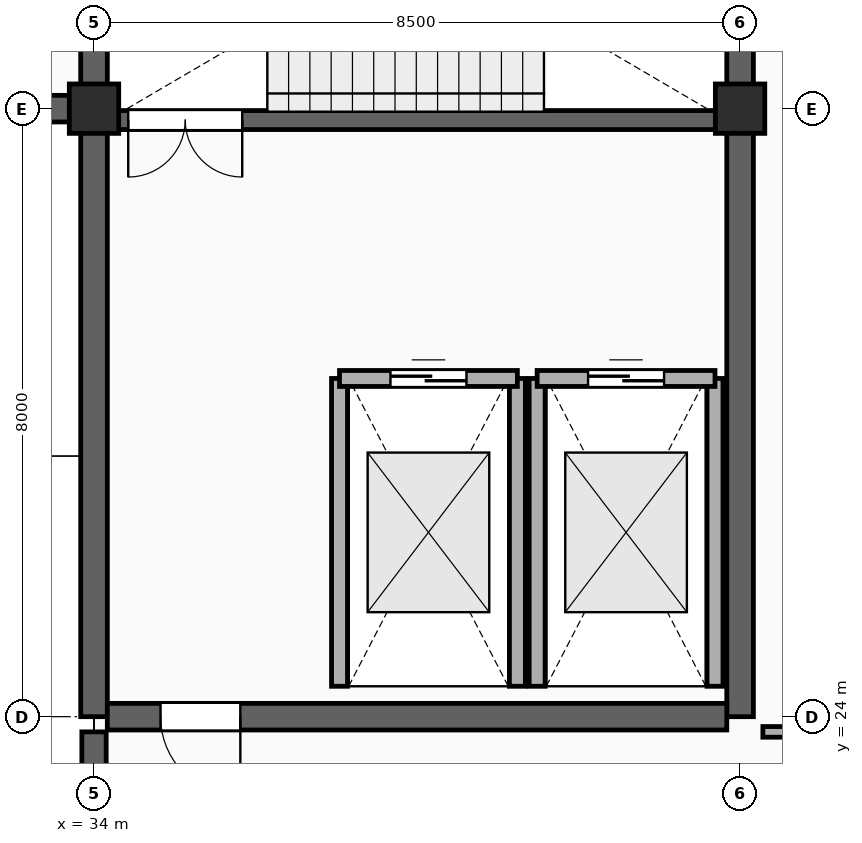
"""IFC4 building model, lengths in metres.
Left out: names, types, materials, properties, quantities, classifications, styles, units other than length and angle.
Written with IfcOpenShell. Run it as: python <this file> out.ifc"""

import sys

from ifc_helpers import new_model, si_unit, direction, frame, frame_2d, origin, origin_2d, place, context, subcontext, project, spatial, rectangle, extrude, element, fill, save


model = new_model("IFC4")
c1 = context("Model", 3, precision=1e-05, world=origin(), true_north=direction((0.0, 1.0)))
c2 = subcontext(c1, "Body", "Model", "MODEL_VIEW")
j1 = project(units=[si_unit("LENGTHUNIT", "METRE"), si_unit("PLANEANGLEUNIT", "RADIAN")], contexts=[c1])
p1 = place(None, origin())
s1 = spatial("IfcSite", under=j1, at=p1, CompositionType="ELEMENT")
p2 = place(p1, origin())
s2 = spatial("IfcBuilding", under=s1, at=p2, CompositionType="ELEMENT")
p3 = place(p2, frame((0.0, 0.0, 15.0)))
s3 = spatial("IfcBuildingStorey", under=s2, at=p3, CompositionType="ELEMENT", Elevation=15.0)
p4 = place(p3, frame((34.0, 32.0, 0.0), z_axis=(0.0, 0.0, 1.0), x_axis=(0.0, 1.0, 0.0)))
e1 = element("IfcWall", 1, at=p4, inside=s3, PredefinedType="SHEAR", context=c2, shape_type="SweptSolid", body=[
    extrude(rectangle(XDim=12.8, YDim=0.35, at=frame_2d((6.4, 0.0))), origin(), (0.0, 0.0, 1.0), 4.49),
])
p5 = place(p3, frame((25.675, 32.0, 0.0), z_axis=(0.0, 0.0, 1.0), x_axis=(1.0, 0.0, 0.0)))
e2 = element("IfcWall", 2, at=p5, inside=s3, PredefinedType="SHEAR", context=c2, shape_type="SweptSolid", body=[
    extrude(rectangle(XDim=8.15, YDim=0.35, at=frame_2d((4.075, 0.0))), origin(), (0.0, 0.0, 1.0), 4.49),
])
p6 = place(p3, frame((34.0, 24.0, 0.0), z_axis=(0.0, 0.0, 1.0), x_axis=(0.0, 1.0, 0.0)))
e3 = element("IfcWall", 3, at=p6, inside=s3, PredefinedType="SHEAR", context=c2, shape_type="SweptSolid", body=[
    extrude(rectangle(XDim=7.8, YDim=0.35, at=frame_2d((3.9, 0.0))), origin(), (0.0, 0.0, 1.0), 4.64),
])
p7 = place(p3, frame((42.5, 24.0, 0.0), z_axis=(0.0, 0.0, 1.0), x_axis=(0.0, 1.0, 0.0)))
e4 = element("IfcWall", 4, at=p7, inside=s3, PredefinedType="SHEAR", context=c2, shape_type="SweptSolid", body=[
    extrude(rectangle(XDim=12.8, YDim=0.35, at=frame_2d((6.4, 0.0))), origin(), (0.0, 0.0, 1.0), 4.64),
])
p8 = place(p3, frame((34.175, 24.0, 0.0), z_axis=(0.0, 0.0, 1.0), x_axis=(1.0, 0.0, 0.0)))
e5 = element("IfcWall", 5, at=p8, inside=s3, PredefinedType="SHEAR", context=c2, shape_type="SweptSolid", body=[
    extrude(rectangle(XDim=8.15, YDim=0.35, at=frame_2d((4.075, 0.0))), origin(), (0.0, 0.0, 1.0), 4.64),
])
p9 = place(p8, frame((0.7, 0.0, 0.0)))
e6 = element("IfcOpeningElement", 6, at=p9, cuts=e5, PredefinedType="OPENING", context=c2, shape_type="SweptSolid", body=[
    extrude(rectangle(XDim=1.05, YDim=2.15, at=frame_2d((0.525, 1.075))), frame((0.0, 0.187, 0.0), z_axis=(0.0, -1.0, 0.0), x_axis=(1.0, 0.0, 0.0)), (0.0, 0.0, 1.0), 0.374),
])
p10 = place(p3, frame((34.25, 31.85, 0.0), z_axis=(0.0, 0.0, 1.0), x_axis=(1.0, 0.0, 0.0)))
e7 = element("IfcWall", 7, at=p10, inside=s3, PredefinedType="STANDARD", context=c2, shape_type="SweptSolid", body=[
    extrude(rectangle(XDim=8.0, YDim=0.25, at=frame_2d((4.0, 0.0))), origin(), (0.0, 0.0, 1.0), 4.64),
])
p11 = place(p10, frame((0.2, 0.0, 0.0)))
e8 = element("IfcOpeningElement", 8, at=p11, cuts=e7, PredefinedType="OPENING", context=c2, shape_type="SweptSolid", body=[
    extrude(rectangle(XDim=1.5, YDim=2.2, at=frame_2d((0.75, 1.1))), frame((0.0, 0.137, 0.0), z_axis=(0.0, -1.0, 0.0), x_axis=(1.0, 0.0, 0.0)), (0.0, 0.0, 1.0), 0.274),
])
for number, where, z_axis, x_axis in (
    (9, (37.23, 24.4, 0.0), (0.0, 0.0, 1.0), (0.0, 1.0, 0.0)),
    (10, (39.57, 24.4, 0.0), (0.0, 0.0, 1.0), (0.0, 1.0, 0.0)),
):
    element("IfcWall", number, at=place(p3, frame(where, z_axis=z_axis, x_axis=x_axis)), inside=s3, PredefinedType="PARTITIONING", context=c2, shape_type="SweptSolid", body=[
        extrude(rectangle(XDim=4.05, YDim=0.21, at=frame_2d((2.025, 0.0))), origin(), (0.0, 0.0, 1.0), 4.64),
    ])
p12 = place(p3, frame((37.23, 28.45, 0.0), z_axis=(0.0, 0.0, 1.0), x_axis=(1.0, 0.0, 0.0)))
e11 = element("IfcWall", 11, at=p12, inside=s3, PredefinedType="PARTITIONING", context=c2, shape_type="SweptSolid", body=[
    extrude(rectangle(XDim=2.34, YDim=0.21, at=frame_2d((1.17, 0.0))), origin(), (0.0, 0.0, 1.0), 4.64),
])
p13 = place(p12, frame((0.67, 0.0, 0.0)))
e12 = element("IfcOpeningElement", 12, at=p13, cuts=e11, PredefinedType="OPENING", context=c2, shape_type="SweptSolid", body=[
    extrude(rectangle(XDim=1.0, YDim=2.2, at=frame_2d((0.5, 1.1))), frame((0.0, 0.117, 0.0), z_axis=(0.0, -1.0, 0.0), x_axis=(1.0, 0.0, 0.0)), (0.0, 0.0, 1.0), 0.234),
])
for number, where, z_axis, x_axis in (
    (13, (39.83, 24.4, 0.0), (0.0, 0.0, 1.0), (0.0, 1.0, 0.0)),
    (14, (42.17, 24.4, 0.0), (0.0, 0.0, 1.0), (0.0, 1.0, 0.0)),
):
    element("IfcWall", number, at=place(p3, frame(where, z_axis=z_axis, x_axis=x_axis)), inside=s3, PredefinedType="PARTITIONING", context=c2, shape_type="SweptSolid", body=[
        extrude(rectangle(XDim=4.05, YDim=0.21, at=frame_2d((2.025, 0.0))), origin(), (0.0, 0.0, 1.0), 4.64),
    ])
p14 = place(p3, frame((39.83, 28.45, 0.0), z_axis=(0.0, 0.0, 1.0), x_axis=(1.0, 0.0, 0.0)))
e15 = element("IfcWall", 15, at=p14, inside=s3, PredefinedType="PARTITIONING", context=c2, shape_type="SweptSolid", body=[
    extrude(rectangle(XDim=2.34, YDim=0.21, at=frame_2d((1.17, 0.0))), origin(), (0.0, 0.0, 1.0), 4.64),
])
p15 = place(p14, frame((0.67, 0.0, 0.0)))
e16 = element("IfcOpeningElement", 16, at=p15, cuts=e15, PredefinedType="OPENING", context=c2, shape_type="SweptSolid", body=[
    extrude(rectangle(XDim=1.0, YDim=2.2, at=frame_2d((0.5, 1.1))), frame((0.0, 0.117, 0.0), z_axis=(0.0, -1.0, 0.0), x_axis=(1.0, 0.0, 0.0)), (0.0, 0.0, 1.0), 0.234),
])
p16 = place(p3, frame((34.0, 32.0, 0.0), z_axis=(0.0, 0.0, 1.0), x_axis=(1.0, 0.0, 0.0)))
e17 = element("IfcColumn", 17, at=p16, inside=s3, PredefinedType="COLUMN", context=c2, shape_type="SweptSolid", body=[
    extrude(rectangle(XDim=0.65, YDim=0.65, at=origin_2d()), origin(), (0.0, 0.0, 1.0), 4.49),
])
p17 = place(p3, frame((42.5, 32.0, 0.0), z_axis=(0.0, 0.0, 1.0), x_axis=(1.0, 0.0, 0.0)))
e18 = element("IfcColumn", 18, at=p17, inside=s3, PredefinedType="COLUMN", context=c2, shape_type="SweptSolid", body=[
    extrude(rectangle(XDim=0.65, YDim=0.65, at=origin_2d()), origin(), (0.0, 0.0, 1.0), 4.52),
])
p18 = place(p3, frame((34.0, 0.0, 0.0), z_axis=(0.0, 0.0, 1.0), x_axis=(0.0, 1.0, 0.0)))
e19 = element("IfcWall", 19, at=p18, inside=s3, PredefinedType="SHEAR", context=c2, shape_type="SweptSolid", body=[
    extrude(rectangle(XDim=23.8, YDim=0.32, at=frame_2d((11.9, 0.0))), origin(), (0.0, 0.0, 1.0), 4.5),
])
p19 = place(p3, frame((42.8, 23.8, 0.0), z_axis=(0.0, 0.0, 1.0), x_axis=(1.0, 0.0, 0.0)))
e20 = element("IfcWall", 20, at=p19, inside=s3, PredefinedType="PARTITIONING", context=c2, shape_type="SweptSolid", body=[
    extrude(rectangle(XDim=24.9, YDim=0.14, at=frame_2d((12.45, 0.0))), origin(), (0.0, 0.0, 1.0), 3.708),
])
p20 = place(p19, frame((10.0, 0.0, 0.0)))
e21 = element("IfcOpeningElement", 21, at=p20, cuts=e20, PredefinedType="OPENING", context=c2, shape_type="SweptSolid", body=[
    extrude(rectangle(XDim=1.7, YDim=2.35, at=frame_2d((0.85, 1.175))), frame((0.0, 0.082, 0.0), z_axis=(0.0, -1.0, 0.0), x_axis=(1.0, 0.0, 0.0)), (0.0, 0.0, 1.0), 0.164),
])
p21 = place(p11, frame((1.5, 0.0, 0.0), z_axis=(0.0, 0.0, 1.0), x_axis=(-1.0, 0.0, 0.0)))
e22 = element("IfcDoor", 22, at=p21, inside=s3, OperationType="DOUBLE_DOOR_SINGLE_SWING", PredefinedType="DOOR", context=c2, shape_type="SweptSolid", body=[
    extrude(rectangle(XDim=1.5, YDim=2.2, at=frame_2d((0.75, 1.1))), frame((0.0, 0.025, 0.0), z_axis=(0.0, -1.0, 0.0), x_axis=(1.0, 0.0, 0.0)), (0.0, 0.0, 1.0), 0.05),
])
fill(e8, e22)
p22 = place(p13, origin())
e23 = element("IfcDoor", 23, at=p22, inside=s3, OperationType="DOUBLE_DOOR_SLIDING", PredefinedType="DOOR", context=c2, shape_type="SweptSolid", body=[
    extrude(rectangle(XDim=1.0, YDim=2.2, at=frame_2d((0.5, 1.1))), frame((0.0, 0.025, 0.0), z_axis=(0.0, -1.0, 0.0), x_axis=(1.0, 0.0, 0.0)), (0.0, 0.0, 1.0), 0.05),
])
fill(e12, e23)
p23 = place(p15, origin())
e24 = element("IfcDoor", 24, at=p23, inside=s3, OperationType="DOUBLE_DOOR_SLIDING", PredefinedType="DOOR", context=c2, shape_type="SweptSolid", body=[
    extrude(rectangle(XDim=1.0, YDim=2.2, at=frame_2d((0.5, 1.1))), frame((0.0, 0.025, 0.0), z_axis=(0.0, -1.0, 0.0), x_axis=(1.0, 0.0, 0.0)), (0.0, 0.0, 1.0), 0.05),
])
fill(e16, e24)
p24 = place(p9, frame((1.05, 0.0, 0.0), z_axis=(0.0, 0.0, 1.0), x_axis=(-1.0, 0.0, 0.0)))
e25 = element("IfcDoor", 25, at=p24, inside=s3, OperationType="SINGLE_SWING_RIGHT", PredefinedType="DOOR", context=c2, shape_type="SweptSolid", body=[
    extrude(rectangle(XDim=1.05, YDim=2.15, at=frame_2d((0.525, 1.075))), frame((0.0, 0.025, 0.0), z_axis=(0.0, -1.0, 0.0), x_axis=(1.0, 0.0, 0.0)), (0.0, 0.0, 1.0), 0.05),
])
fill(e6, e25)
save(model, sys.argv[1])
